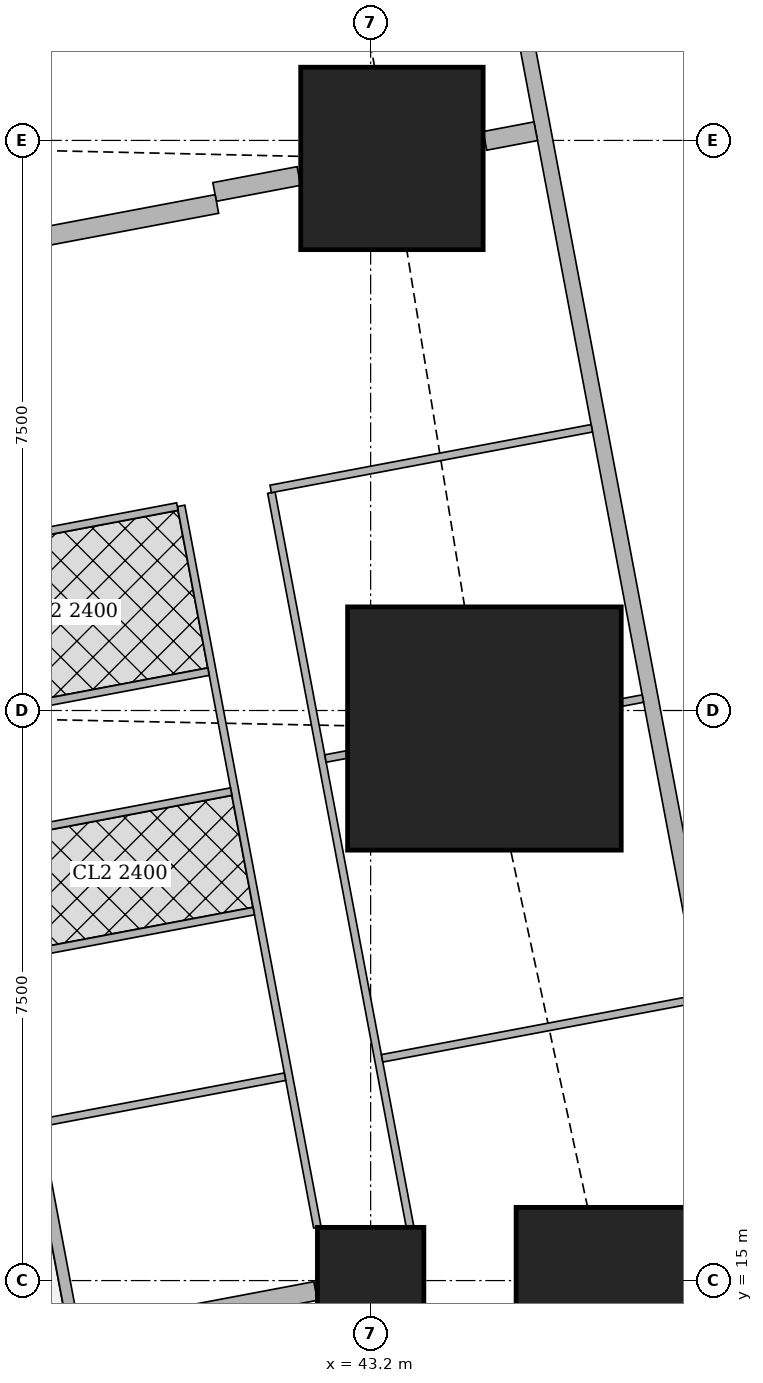
"""IFC4 building model, lengths in metres.
Left out: names, types, materials, properties, quantities, classifications, styles, units other than length and angle.
Written with IfcOpenShell. Run it as: python <this file> out.ifc"""

import sys

from ifc_helpers import new_model, si_unit, direction, frame, frame_2d, origin, origin_2d, place, context, subcontext, project, spatial, rectangle, extrude, element, fill, save


model = new_model("IFC4")
c1 = context("Model", 3, precision=1e-05, world=origin(), true_north=direction((0.0, 1.0)))
c2 = subcontext(c1, "Body", "Model", "MODEL_VIEW")
j1 = project(units=[si_unit("LENGTHUNIT", "METRE"), si_unit("PLANEANGLEUNIT", "RADIAN")], contexts=[c1])
p1 = place(None, origin())
s1 = spatial("IfcSite", under=j1, at=p1, CompositionType="ELEMENT")
p2 = place(p1, origin())
s2 = spatial("IfcBuilding", under=s1, at=p2, CompositionType="ELEMENT")
p3 = place(p2, frame((0.0, 0.0, 234.95)))
s3 = spatial("IfcBuildingStorey", under=s2, at=p3, CompositionType="ELEMENT", Elevation=234.95)
p4 = place(p3, frame((43.2, 15.0, 0.0), z_axis=(0.0, 0.0, 1.0), x_axis=(1.0, 0.0, 0.0)))
e1 = element("IfcColumn", 1, at=p4, inside=s3, PredefinedType="COLUMN", context=c2, shape_type="SweptSolid", body=[
    extrude(rectangle(XDim=1.4, YDim=1.4, at=origin_2d()), origin(), (0.0, 0.0, 1.0), 3.75),
])
p5 = place(p3, frame((46.314, 14.763, 0.0), z_axis=(0.0, 0.0, 1.0), x_axis=(1.0, 0.0, 0.0)))
e2 = element("IfcColumn", 2, at=p5, inside=s3, PredefinedType="COLUMN", context=c2, shape_type="SweptSolid", body=[
    extrude(rectangle(XDim=2.4, YDim=2.4, at=origin_2d()), origin(), (0.0, 0.0, 1.0), 3.75),
])
p6 = place(p3, frame((44.697, 22.263, 0.0), z_axis=(0.0, 0.0, 1.0), x_axis=(1.0, 0.0, 0.0)))
e3 = element("IfcColumn", 3, at=p6, inside=s3, PredefinedType="COLUMN", context=c2, shape_type="SweptSolid", body=[
    extrude(rectangle(XDim=3.6, YDim=3.2, at=origin_2d()), origin(), (0.0, 0.0, 1.0), 3.75),
])
p7 = place(p3, frame((43.48, 29.763, 0.0), z_axis=(0.0, 0.0, 1.0), x_axis=(1.0, 0.0, 0.0)))
e4 = element("IfcColumn", 4, at=p7, inside=s3, PredefinedType="COLUMN", context=c2, shape_type="SweptSolid", body=[
    extrude(rectangle(XDim=2.4, YDim=2.4, at=origin_2d()), origin(), (0.0, 0.0, 1.0), 3.75),
])
p8 = place(p3, frame((50.653, 2.703, 0.0), z_axis=(0.0, 0.0, 1.0), x_axis=(-0.185612026696, 0.982623109613, 0.0)))
e5 = element("IfcWall", 5, at=p8, inside=s3, PredefinedType="SOLIDWALL", context=c2, shape_type="SweptSolid", body=[
    extrude(rectangle(XDim=41.393, YDim=0.2, at=frame_2d((20.697, 0.0))), origin(), (0.0, 0.0, 1.0), 3.5),
])
p9 = place(p8, frame((1.633, 0.0, 0.9)))
e6 = element("IfcOpeningElement", 6, at=p9, cuts=e5, PredefinedType="OPENING", context=c2, shape_type="SweptSolid", body=[
    extrude(rectangle(XDim=1.8, YDim=1.5, at=frame_2d((0.9, 0.75))), frame((0.0, 0.11, 0.0), z_axis=(0.0, -1.0, 0.0), x_axis=(1.0, 0.0, 0.0)), (0.0, 0.0, 1.0), 0.22),
])
p10 = place(p8, frame((6.032, 0.0, 0.9)))
e7 = element("IfcOpeningElement", 7, at=p10, cuts=e5, PredefinedType="OPENING", context=c2, shape_type="SweptSolid", body=[
    extrude(rectangle(XDim=1.8, YDim=1.5, at=frame_2d((0.9, 0.75))), frame((0.0, 0.11, 0.0), z_axis=(0.0, -1.0, 0.0), x_axis=(1.0, 0.0, 0.0)), (0.0, 0.0, 1.0), 0.22),
])
p11 = place(p8, frame((9.848, 0.0, 0.9)))
e8 = element("IfcOpeningElement", 8, at=p11, cuts=e5, PredefinedType="OPENING", context=c2, shape_type="SweptSolid", body=[
    extrude(rectangle(XDim=1.8, YDim=1.5, at=frame_2d((0.9, 0.75))), frame((0.0, 0.11, 0.0), z_axis=(0.0, -1.0, 0.0), x_axis=(1.0, 0.0, 0.0)), (0.0, 0.0, 1.0), 0.22),
])
p12 = place(p8, frame((13.664, 0.0, 0.9)))
e9 = element("IfcOpeningElement", 9, at=p12, cuts=e5, PredefinedType="OPENING", context=c2, shape_type="SweptSolid", body=[
    extrude(rectangle(XDim=1.8, YDim=1.5, at=frame_2d((0.9, 0.75))), frame((0.0, 0.11, 0.0), z_axis=(0.0, -1.0, 0.0), x_axis=(1.0, 0.0, 0.0)), (0.0, 0.0, 1.0), 0.22),
])
p13 = place(p8, frame((17.481, 0.0, 0.9)))
e10 = element("IfcOpeningElement", 10, at=p13, cuts=e5, PredefinedType="OPENING", context=c2, shape_type="SweptSolid", body=[
    extrude(rectangle(XDim=1.8, YDim=1.5, at=frame_2d((0.9, 0.75))), frame((0.0, 0.11, 0.0), z_axis=(0.0, -1.0, 0.0), x_axis=(1.0, 0.0, 0.0)), (0.0, 0.0, 1.0), 0.22),
])
p14 = place(p8, frame((21.297, 0.0, 0.9)))
e11 = element("IfcOpeningElement", 11, at=p14, cuts=e5, PredefinedType="OPENING", context=c2, shape_type="SweptSolid", body=[
    extrude(rectangle(XDim=1.8, YDim=1.5, at=frame_2d((0.9, 0.75))), frame((0.0, 0.11, 0.0), z_axis=(0.0, -1.0, 0.0), x_axis=(1.0, 0.0, 0.0)), (0.0, 0.0, 1.0), 0.22),
])
p15 = place(p8, frame((25.113, 0.0, 0.9)))
e12 = element("IfcOpeningElement", 12, at=p15, cuts=e5, PredefinedType="OPENING", context=c2, shape_type="SweptSolid", body=[
    extrude(rectangle(XDim=1.8, YDim=1.5, at=frame_2d((0.9, 0.75))), frame((0.0, 0.11, 0.0), z_axis=(0.0, -1.0, 0.0), x_axis=(1.0, 0.0, 0.0)), (0.0, 0.0, 1.0), 0.22),
])
p16 = place(p8, frame((28.93, 0.0, 0.9)))
e13 = element("IfcOpeningElement", 13, at=p16, cuts=e5, PredefinedType="OPENING", context=c2, shape_type="SweptSolid", body=[
    extrude(rectangle(XDim=1.8, YDim=1.5, at=frame_2d((0.9, 0.75))), frame((0.0, 0.11, 0.0), z_axis=(0.0, -1.0, 0.0), x_axis=(1.0, 0.0, 0.0)), (0.0, 0.0, 1.0), 0.22),
])
p17 = place(p8, frame((32.746, 0.0, 0.9)))
e14 = element("IfcOpeningElement", 14, at=p17, cuts=e5, PredefinedType="OPENING", context=c2, shape_type="SweptSolid", body=[
    extrude(rectangle(XDim=1.8, YDim=1.5, at=frame_2d((0.9, 0.75))), frame((0.0, 0.11, 0.0), z_axis=(0.0, -1.0, 0.0), x_axis=(1.0, 0.0, 0.0)), (0.0, 0.0, 1.0), 0.22),
])
p18 = place(p8, frame((36.481, 0.0, 0.9)))
e15 = element("IfcOpeningElement", 15, at=p18, cuts=e5, PredefinedType="OPENING", context=c2, shape_type="SweptSolid", body=[
    extrude(rectangle(XDim=1.8, YDim=1.5, at=frame_2d((0.9, 0.75))), frame((0.0, 0.11, 0.0), z_axis=(0.0, -1.0, 0.0), x_axis=(1.0, 0.0, 0.0)), (0.0, 0.0, 1.0), 0.22),
])
p19 = place(p3, frame((33.933, 42.73, 0.0), z_axis=(0.0, 0.0, 1.0), x_axis=(0.185595417643, -0.982626246825, 0.0)))
e16 = element("IfcWall", 16, at=p19, inside=s3, PredefinedType="SOLIDWALL", context=c2, shape_type="SweptSolid", body=[
    extrude(rectangle(XDim=41.051, YDim=0.15, at=frame_2d((20.525, 0.0))), origin(), (0.0, 0.0, 1.0), 2.5),
])
p20 = place(p19, frame((12.266, 0.0, 0.0)))
e17 = element("IfcOpeningElement", 17, at=p20, cuts=e16, PredefinedType="OPENING", context=c2, shape_type="SweptSolid", body=[
    extrude(rectangle(XDim=1.0, YDim=2.1, at=frame_2d((0.5, 1.05))), frame((0.0, 0.085, 0.0), z_axis=(0.0, -1.0, 0.0), x_axis=(1.0, 0.0, 0.0)), (0.0, 0.0, 1.0), 0.17),
])
p21 = place(p19, frame((16.082, 0.0, 0.0)))
e18 = element("IfcOpeningElement", 18, at=p21, cuts=e16, PredefinedType="OPENING", context=c2, shape_type="SweptSolid", body=[
    extrude(rectangle(XDim=1.0, YDim=2.1, at=frame_2d((0.5, 1.05))), frame((0.0, 0.085, 0.0), z_axis=(0.0, -1.0, 0.0), x_axis=(1.0, 0.0, 0.0)), (0.0, 0.0, 1.0), 0.17),
])
p22 = place(p19, frame((30.862, 0.0, 0.0)))
e19 = element("IfcOpeningElement", 19, at=p22, cuts=e16, PredefinedType="OPENING", context=c2, shape_type="SweptSolid", body=[
    extrude(rectangle(XDim=1.0, YDim=2.1, at=frame_2d((0.5, 1.05))), frame((0.0, 0.085, 0.0), z_axis=(0.0, -1.0, 0.0), x_axis=(1.0, 0.0, 0.0)), (0.0, 0.0, 1.0), 0.17),
])
p23 = place(p3, frame((41.894, 25.366, 0.0), z_axis=(0.0, 0.0, 1.0), x_axis=(0.185612905165, -0.982622943675, 0.0)))
e20 = element("IfcWall", 20, at=p23, inside=s3, PredefinedType="PARTITIONING", context=c2, shape_type="SweptSolid", body=[
    extrude(rectangle(XDim=9.827, YDim=0.1, at=frame_2d((4.913, 0.0))), origin(), (0.0, 0.0, 1.0), 2.5),
])
p24 = place(p23, frame((0.151, 0.0, 0.0)))
e21 = element("IfcOpeningElement", 21, at=p24, cuts=e20, PredefinedType="OPENING", context=c2, shape_type="SweptSolid", body=[
    extrude(rectangle(XDim=0.9, YDim=2.1, at=frame_2d((0.45, 1.05))), frame((0.0, 0.06, 0.0), z_axis=(0.0, -1.0, 0.0), x_axis=(1.0, 0.0, 0.0)), (0.0, 0.0, 1.0), 0.12),
])
p25 = place(p23, frame((5.05, 0.0, 0.0)))
e22 = element("IfcOpeningElement", 22, at=p25, cuts=e20, PredefinedType="OPENING", context=c2, shape_type="SweptSolid", body=[
    extrude(rectangle(XDim=0.9, YDim=2.1, at=frame_2d((0.45, 1.05))), frame((0.0, 0.06, 0.0), z_axis=(0.0, -1.0, 0.0), x_axis=(1.0, 0.0, 0.0)), (0.0, 0.0, 1.0), 0.12),
])
p26 = place(p23, frame((7.783, 0.0, 0.0)))
e23 = element("IfcOpeningElement", 23, at=p26, cuts=e20, PredefinedType="OPENING", context=c2, shape_type="SweptSolid", body=[
    extrude(rectangle(XDim=0.9, YDim=2.1, at=frame_2d((0.45, 1.05))), frame((0.0, 0.06, 0.0), z_axis=(0.0, -1.0, 0.0), x_axis=(1.0, 0.0, 0.0)), (0.0, 0.0, 1.0), 0.12),
])
p27 = place(p3, frame((40.706, 25.192, 0.0), z_axis=(0.0, 0.0, 1.0), x_axis=(0.185629824463, -0.982619747547, 0.0)))
e24 = element("IfcWall", 24, at=p27, inside=s3, PredefinedType="PARTITIONING", context=c2, shape_type="SweptSolid", body=[
    extrude(rectangle(XDim=9.659, YDim=0.1, at=frame_2d((4.83, 0.0))), origin(), (0.0, 0.0, 1.0), 2.5),
])
p28 = place(p27, frame((0.655, 0.0, 0.0)))
e25 = element("IfcOpeningElement", 25, at=p28, cuts=e24, PredefinedType="OPENING", context=c2, shape_type="SweptSolid", body=[
    extrude(rectangle(XDim=0.9, YDim=2.1, at=frame_2d((0.45, 1.05))), frame((0.0, 0.06, 0.0), z_axis=(0.0, -1.0, 0.0), x_axis=(1.0, 0.0, 0.0)), (0.0, 0.0, 1.0), 0.12),
])
p29 = place(p27, frame((4.166, 0.0, 0.0)))
e26 = element("IfcOpeningElement", 26, at=p29, cuts=e24, PredefinedType="OPENING", context=c2, shape_type="SweptSolid", body=[
    extrude(rectangle(XDim=0.9, YDim=2.1, at=frame_2d((0.45, 1.05))), frame((0.0, 0.06, 0.0), z_axis=(0.0, -1.0, 0.0), x_axis=(1.0, 0.0, 0.0)), (0.0, 0.0, 1.0), 0.12),
])
p30 = place(p27, frame((2.563, 0.0, 0.0)))
e27 = element("IfcOpeningElement", 27, at=p30, cuts=e24, PredefinedType="OPENING", context=c2, shape_type="SweptSolid", body=[
    extrude(rectangle(XDim=0.9, YDim=2.1, at=frame_2d((0.45, 1.05))), frame((0.0, 0.06, 0.0), z_axis=(0.0, -1.0, 0.0), x_axis=(1.0, 0.0, 0.0)), (0.0, 0.0, 1.0), 0.12),
])
p31 = place(p27, frame((6.074, 0.0, 0.0)))
e28 = element("IfcOpeningElement", 28, at=p31, cuts=e24, PredefinedType="OPENING", context=c2, shape_type="SweptSolid", body=[
    extrude(rectangle(XDim=0.9, YDim=2.1, at=frame_2d((0.45, 1.05))), frame((0.0, 0.06, 0.0), z_axis=(0.0, -1.0, 0.0), x_axis=(1.0, 0.0, 0.0)), (0.0, 0.0, 1.0), 0.12),
])
p32 = place(p3, frame((46.11, 26.213, 0.0), z_axis=(0.0, 0.0, 1.0), x_axis=(-0.982633535512, -0.185556823879, 0.0)))
e29 = element("IfcWall", 29, at=p32, inside=s3, PredefinedType="PARTITIONING", context=c2, shape_type="SweptSolid", body=[
    extrude(rectangle(XDim=4.3, YDim=0.1, at=frame_2d((2.15, 0.0))), origin(), (0.0, 0.0, 1.0), 2.05),
])
p33 = place(p3, frame((46.782, 22.657, 0.0), z_axis=(0.0, 0.0, 1.0), x_axis=(-0.982574553168, -0.185868898601, 0.0)))
e30 = element("IfcWall", 30, at=p33, inside=s3, PredefinedType="PARTITIONING", context=c2, shape_type="SweptSolid", body=[
    extrude(rectangle(XDim=0.28, YDim=0.1, at=frame_2d((0.14, 0.0))), origin(), (0.0, 0.0, 1.0), 3.5),
])
p34 = place(p3, frame((42.887, 21.921, 0.0), z_axis=(0.0, 0.0, 1.0), x_axis=(-0.982688058078, -0.185267861514, 0.0)))
e31 = element("IfcWall", 31, at=p34, inside=s3, PredefinedType="PARTITIONING", context=c2, shape_type="SweptSolid", body=[
    extrude(rectangle(XDim=0.286, YDim=0.1, at=frame_2d((0.143, 0.0))), origin(), (0.0, 0.0, 1.0), 2.5),
])
p35 = place(p3, frame((47.527, 18.712, 0.0), z_axis=(0.0, 0.0, 1.0), x_axis=(-0.982665405803, -0.185387972203, 0.0)))
e32 = element("IfcWall", 32, at=p35, inside=s3, PredefinedType="PARTITIONING", context=c2, shape_type="SweptSolid", body=[
    extrude(rectangle(XDim=4.25, YDim=0.1, at=frame_2d((2.125, 0.0))), origin(), (0.0, 0.0, 1.0), 2.05),
])
for number, where, z_axis, x_axis in (
    (33, (40.657, 25.183, 0.0), (0.0, 0.0, 1.0), (-0.983, -0.186, 0.0)),
    (34, (41.365, 21.433, 0.0), (0.0, 0.0, 1.0), (-0.983, -0.186, 0.0)),
):
    element("IfcWall", number, at=place(p3, frame(where, z_axis=z_axis, x_axis=x_axis)), inside=s3, PredefinedType="PARTITIONING", context=c2, shape_type="SweptSolid", body=[
        extrude(rectangle(XDim=3.275, YDim=0.1, at=frame_2d((1.637, 0.0))), origin(), (0.0, 0.0, 1.0), 3.5),
    ])
p36 = place(p3, frame((42.073, 17.682, 0.0), z_axis=(0.0, 0.0, 1.0), x_axis=(-0.982620626894, -0.185625169636, 0.0)))
e35 = element("IfcWall", 35, at=p36, inside=s3, PredefinedType="PARTITIONING", context=c2, shape_type="SweptSolid", body=[
    extrude(rectangle(XDim=3.275, YDim=0.1, at=frame_2d((1.637, 0.0))), origin(), (0.0, 0.0, 1.0), 3.5),
])
p37 = place(p36, frame((1.2, 0.0, 0.0)))
e36 = element("IfcOpeningElement", 36, at=p37, cuts=e35, PredefinedType="OPENING", context=c2, shape_type="SweptSolid", body=[
    extrude(rectangle(XDim=0.9, YDim=2.1, at=frame_2d((0.45, 1.05))), frame((0.0, 0.06, 0.0), z_axis=(0.0, -1.0, 0.0), x_axis=(1.0, 0.0, 0.0)), (0.0, 0.0, 1.0), 0.12),
])
p38 = place(p3, frame((41.067, 23.011, 0.0), z_axis=(0.0, 0.0, 1.0), x_axis=(-0.982618057925, -0.185638768151, 0.0)))
e37 = element("IfcWall", 37, at=p38, inside=s3, PredefinedType="PARTITIONING", context=c2, shape_type="SweptSolid", body=[
    extrude(rectangle(XDim=3.275, YDim=0.1, at=frame_2d((1.637, 0.0))), origin(), (0.0, 0.0, 1.0), 2.5),
])
p39 = place(p3, frame((41.662, 19.861, 0.0), z_axis=(0.0, 0.0, 1.0), x_axis=(-0.982607026909, -0.185697147715, 0.0)))
e38 = element("IfcWall", 38, at=p39, inside=s3, PredefinedType="PARTITIONING", context=c2, shape_type="SweptSolid", body=[
    extrude(rectangle(XDim=3.275, YDim=0.1, at=frame_2d((1.637, 0.0))), origin(), (0.0, 0.0, 1.0), 3.5),
])
p40 = place(p3, frame((45.372, 30.121, 0.0), z_axis=(0.0, 0.0, 1.0), x_axis=(-0.982347993061, -0.187062611252, 0.0)))
e39 = element("IfcWall", 39, at=p40, inside=s3, PredefinedType="SOLIDWALL", context=c2, shape_type="SweptSolid", body=[
    extrude(rectangle(XDim=0.68, YDim=0.25, at=frame_2d((0.34, 0.0))), origin(), (0.0, 0.0, 1.0), 2.05),
])
p41 = place(p3, frame((42.256, 29.532, 0.0), z_axis=(0.0, 0.0, 1.0), x_axis=(-0.982549954272, -0.185998890749, 0.0)))
e40 = element("IfcWall", 40, at=p41, inside=s3, PredefinedType="SOLIDWALL", context=c2, shape_type="SweptSolid", body=[
    extrude(rectangle(XDim=1.129, YDim=0.25, at=frame_2d((0.564, 0.0))), origin(), (0.0, 0.0, 1.0), 2.05),
])
p42 = place(p3, frame((41.177, 29.164, 0.0), z_axis=(0.0, 0.0, 1.0), x_axis=(-0.982612837616, -0.185666398014, 0.0)))
e41 = element("IfcWall", 41, at=p42, inside=s3, PredefinedType="SOLIDWALL", context=c2, shape_type="SweptSolid", body=[
    extrude(rectangle(XDim=4.525, YDim=0.25, at=frame_2d((2.262, 0.0))), origin(), (0.0, 0.0, 1.0), 2.5),
])
p43 = place(p3, frame((42.476, 14.863, 0.0), z_axis=(0.0, 0.0, 1.0), x_axis=(-0.982638716117, -0.185529387398, 0.0)))
e42 = element("IfcWall", 42, at=p43, inside=s3, PredefinedType="SOLIDWALL", context=c2, shape_type="SweptSolid", body=[
    extrude(rectangle(XDim=3.148, YDim=0.25, at=frame_2d((1.574, 0.0))), origin(), (0.0, 0.0, 1.0), 3.5),
])
p44 = place(p13, origin())
e43 = element("IfcWindow", 43, at=p44, inside=s3, PartitioningType="SINGLE_PANEL", PredefinedType="WINDOW", context=c2, shape_type="SweptSolid", body=[
    extrude(rectangle(XDim=1.8, YDim=1.5, at=frame_2d((0.9, 0.75))), frame((0.0, 0.03, 0.0), z_axis=(0.0, -1.0, 0.0), x_axis=(1.0, 0.0, 0.0)), (0.0, 0.0, 1.0), 0.06),
])
fill(e10, e43)
p45 = place(p14, origin())
e44 = element("IfcWindow", 44, at=p45, inside=s3, PartitioningType="SINGLE_PANEL", PredefinedType="WINDOW", context=c2, shape_type="SweptSolid", body=[
    extrude(rectangle(XDim=1.8, YDim=1.5, at=frame_2d((0.9, 0.75))), frame((0.0, 0.03, 0.0), z_axis=(0.0, -1.0, 0.0), x_axis=(1.0, 0.0, 0.0)), (0.0, 0.0, 1.0), 0.06),
])
fill(e11, e44)
p46 = place(p15, origin())
e45 = element("IfcWindow", 45, at=p46, inside=s3, PartitioningType="SINGLE_PANEL", PredefinedType="WINDOW", context=c2, shape_type="SweptSolid", body=[
    extrude(rectangle(XDim=1.8, YDim=1.5, at=frame_2d((0.9, 0.75))), frame((0.0, 0.03, 0.0), z_axis=(0.0, -1.0, 0.0), x_axis=(1.0, 0.0, 0.0)), (0.0, 0.0, 1.0), 0.06),
])
fill(e12, e45)
p47 = place(p16, origin())
e46 = element("IfcWindow", 46, at=p47, inside=s3, PartitioningType="SINGLE_PANEL", PredefinedType="WINDOW", context=c2, shape_type="SweptSolid", body=[
    extrude(rectangle(XDim=1.8, YDim=1.5, at=frame_2d((0.9, 0.75))), frame((0.0, 0.03, 0.0), z_axis=(0.0, -1.0, 0.0), x_axis=(1.0, 0.0, 0.0)), (0.0, 0.0, 1.0), 0.06),
])
fill(e13, e46)
p48 = place(p24, origin())
e47 = element("IfcDoor", 47, at=p48, inside=s3, OperationType="SINGLE_SWING_LEFT", PredefinedType="DOOR", context=c2, shape_type="SweptSolid", body=[
    extrude(rectangle(XDim=0.9, YDim=2.1, at=frame_2d((0.45, 1.05))), frame((0.0, 0.025, 0.0), z_axis=(0.0, -1.0, 0.0), x_axis=(1.0, 0.0, 0.0)), (0.0, 0.0, 1.0), 0.05),
])
fill(e21, e47)
p49 = place(p25, origin())
e48 = element("IfcDoor", 48, at=p49, inside=s3, OperationType="SINGLE_SWING_LEFT", PredefinedType="DOOR", context=c2, shape_type="SweptSolid", body=[
    extrude(rectangle(XDim=0.9, YDim=2.1, at=frame_2d((0.45, 1.05))), frame((0.0, 0.025, 0.0), z_axis=(0.0, -1.0, 0.0), x_axis=(1.0, 0.0, 0.0)), (0.0, 0.0, 1.0), 0.05),
])
fill(e22, e48)
p50 = place(p26, origin())
e49 = element("IfcDoor", 49, at=p50, inside=s3, OperationType="SINGLE_SWING_LEFT", PredefinedType="DOOR", context=c2, shape_type="SweptSolid", body=[
    extrude(rectangle(XDim=0.9, YDim=2.1, at=frame_2d((0.45, 1.05))), frame((0.0, 0.025, 0.0), z_axis=(0.0, -1.0, 0.0), x_axis=(1.0, 0.0, 0.0)), (0.0, 0.0, 1.0), 0.05),
])
fill(e23, e49)
p51 = place(p28, origin())
e50 = element("IfcDoor", 50, at=p51, inside=s3, OperationType="SINGLE_SWING_RIGHT", PredefinedType="DOOR", context=c2, shape_type="SweptSolid", body=[
    extrude(rectangle(XDim=0.9, YDim=2.1, at=frame_2d((0.45, 1.05))), frame((0.0, 0.025, 0.0), z_axis=(0.0, -1.0, 0.0), x_axis=(1.0, 0.0, 0.0)), (0.0, 0.0, 1.0), 0.05),
])
fill(e25, e50)
p52 = place(p29, origin())
e51 = element("IfcDoor", 51, at=p52, inside=s3, OperationType="SINGLE_SWING_LEFT", PredefinedType="DOOR", context=c2, shape_type="SweptSolid", body=[
    extrude(rectangle(XDim=0.9, YDim=2.1, at=frame_2d((0.45, 1.05))), frame((0.0, 0.025, 0.0), z_axis=(0.0, -1.0, 0.0), x_axis=(1.0, 0.0, 0.0)), (0.0, 0.0, 1.0), 0.05),
])
fill(e26, e51)
p53 = place(p30, origin())
e52 = element("IfcDoor", 52, at=p53, inside=s3, OperationType="SINGLE_SWING_LEFT", PredefinedType="DOOR", context=c2, shape_type="SweptSolid", body=[
    extrude(rectangle(XDim=0.9, YDim=2.1, at=frame_2d((0.45, 1.05))), frame((0.0, 0.025, 0.0), z_axis=(0.0, -1.0, 0.0), x_axis=(1.0, 0.0, 0.0)), (0.0, 0.0, 1.0), 0.05),
])
fill(e27, e52)
p54 = place(p31, origin())
e53 = element("IfcDoor", 53, at=p54, inside=s3, OperationType="SINGLE_SWING_RIGHT", PredefinedType="DOOR", context=c2, shape_type="SweptSolid", body=[
    extrude(rectangle(XDim=0.9, YDim=2.1, at=frame_2d((0.45, 1.05))), frame((0.0, 0.025, 0.0), z_axis=(0.0, -1.0, 0.0), x_axis=(1.0, 0.0, 0.0)), (0.0, 0.0, 1.0), 0.05),
])
fill(e28, e53)
p55 = place(p37, origin())
e54 = element("IfcDoor", 54, at=p55, inside=s3, OperationType="SINGLE_SWING_LEFT", PredefinedType="DOOR", context=c2, shape_type="SweptSolid", body=[
    extrude(rectangle(XDim=0.9, YDim=2.1, at=frame_2d((0.45, 1.05))), frame((0.0, 0.025, 0.0), z_axis=(0.0, -1.0, 0.0), x_axis=(1.0, 0.0, 0.0)), (0.0, 0.0, 1.0), 0.05),
])
fill(e36, e54)
save(model, sys.argv[1])
